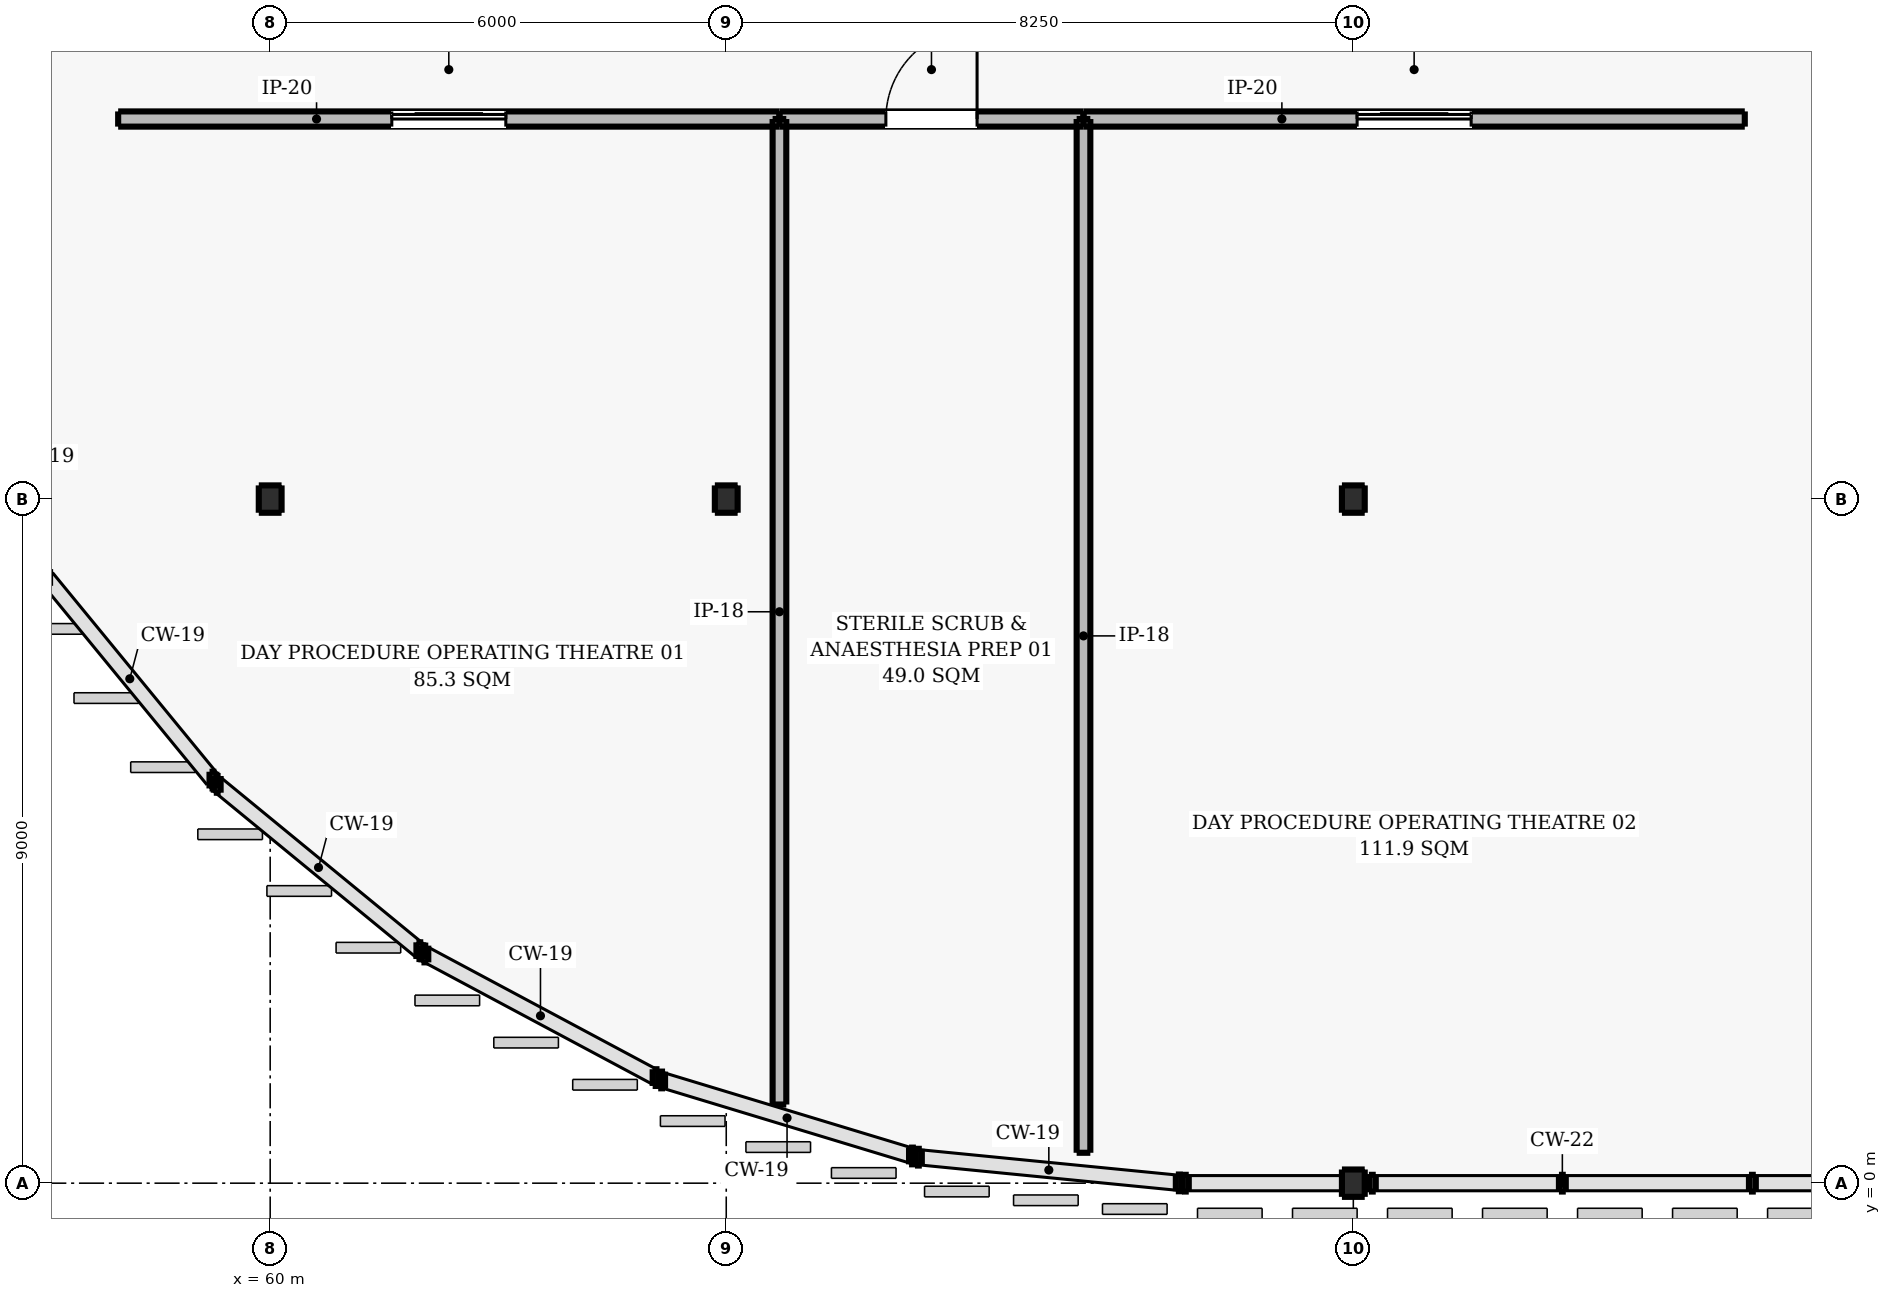
"""IFC4 building model, lengths in metres.
Left out: names, types, materials, properties, quantities, classifications, styles, units other than length and angle.
Written with IfcOpenShell. Run it as: python <this file> out.ifc"""

import sys

from ifc_helpers import new_model, si_unit, direction, frame, frame_2d, origin, origin_2d, place, context, subcontext, project, spatial, rectangle, i_section, extrude, element, fill, save


model = new_model("IFC4")
c1 = context("Model", 3, precision=1e-05, world=origin(), true_north=direction((0.0, 1.0)))
c2 = subcontext(c1, "Body", "Model", "MODEL_VIEW")
j1 = project(units=[si_unit("LENGTHUNIT", "METRE"), si_unit("PLANEANGLEUNIT", "RADIAN")], contexts=[c1])
p1 = place(None, origin())
s1 = spatial("IfcSite", under=j1, at=p1, CompositionType="ELEMENT")
p2 = place(p1, origin())
s2 = spatial("IfcBuilding", under=s1, at=p2, CompositionType="ELEMENT")
p3 = place(p2, frame((0.0, 0.0, 13.8)))
s3 = spatial("IfcBuildingStorey", under=s2, at=p3, CompositionType="ELEMENT", Elevation=13.8)
for number, where, z_axis, x_axis in (
    (1, (60.0, 9.0, 0.0), (0.0, 0.0, 1.0), (1.0, 0.0, 0.0)),
    (2, (66.0, 9.0, 0.0), (0.0, 0.0, 1.0), (1.0, 0.0, 0.0)),
    (3, (74.25, 0.0, 0.0), (0.0, 0.0, 1.0), (1.0, 0.0, 0.0)),
    (4, (74.25, 9.0, 0.0), (0.0, 0.0, 1.0), (1.0, 0.0, 0.0)),
):
    element("IfcColumn", number, at=place(p3, frame(where, z_axis=z_axis, x_axis=x_axis)), inside=s3, PredefinedType="COLUMN", context=c2, shape_type="SweptSolid", body=[
        extrude(i_section(OverallWidth=0.3, OverallDepth=0.36, WebThickness=0.012, FlangeThickness=0.022, FilletRadius=0.027, at=origin_2d()), origin(), (0.0, 0.0, 1.0), 4.2),
    ])
p4 = place(p3, frame((58.0, 14.0, 0.0), z_axis=(0.0, 0.0, 1.0), x_axis=(1.0, 0.0, 0.0)))
e5 = element("IfcWall", 5, at=p4, inside=s3, PredefinedType="PARTITIONING", context=c2, shape_type="SweptSolid", body=[
    extrude(rectangle(XDim=8.7, YDim=0.2, at=frame_2d((4.35, 0.0))), origin(), (0.0, 0.0, 1.0), 3.94),
])
p5 = place(p4, frame((3.6, 0.0, 0.0)))
e6 = element("IfcOpeningElement", 6, at=p5, cuts=e5, PredefinedType="OPENING", context=c2, shape_type="SweptSolid", body=[
    extrude(rectangle(XDim=1.5, YDim=2.25, at=frame_2d((0.75, 1.125))), frame((0.0, 0.11, 0.0), z_axis=(0.0, -1.0, 0.0), x_axis=(1.0, 0.0, 0.0)), (0.0, 0.0, 1.0), 0.22),
])
p6 = place(p3, frame((66.7, 1.035, 0.0), z_axis=(0.0, 0.0, 1.0), x_axis=(0.0, 1.0, 0.0)))
e7 = element("IfcWall", 7, at=p6, inside=s3, PredefinedType="PARTITIONING", context=c2, shape_type="SweptSolid", body=[
    extrude(rectangle(XDim=12.965, YDim=0.18, at=frame_2d((6.482, 0.0))), origin(), (0.0, 0.0, 1.0), 3.94),
])
p7 = place(p3, frame((66.7, 14.0, 0.0), z_axis=(0.0, 0.0, 1.0), x_axis=(1.0, 0.0, 0.0)))
e8 = element("IfcWall", 8, at=p7, inside=s3, PredefinedType="PARTITIONING", context=c2, shape_type="SweptSolid", body=[
    extrude(rectangle(XDim=4.0, YDim=0.2, at=frame_2d((2.0, 0.0))), origin(), (0.0, 0.0, 1.0), 3.94),
])
p8 = place(p7, frame((1.4, 0.0, 0.0)))
e9 = element("IfcOpeningElement", 9, at=p8, cuts=e8, PredefinedType="OPENING", context=c2, shape_type="SweptSolid", body=[
    extrude(rectangle(XDim=1.2, YDim=2.2, at=frame_2d((0.6, 1.1))), frame((0.0, 0.11, 0.0), z_axis=(0.0, -1.0, 0.0), x_axis=(1.0, 0.0, 0.0)), (0.0, 0.0, 1.0), 0.22),
])
p9 = place(p3, frame((70.7, 0.4, 0.0), z_axis=(0.0, 0.0, 1.0), x_axis=(0.0, 1.0, 0.0)))
e10 = element("IfcWall", 10, at=p9, inside=s3, PredefinedType="PARTITIONING", context=c2, shape_type="SweptSolid", body=[
    extrude(rectangle(XDim=13.6, YDim=0.18, at=frame_2d((6.8, 0.0))), origin(), (0.0, 0.0, 1.0), 3.94),
])
p10 = place(p3, frame((70.7, 14.0, 0.0), z_axis=(0.0, 0.0, 1.0), x_axis=(1.0, 0.0, 0.0)))
e11 = element("IfcWall", 11, at=p10, inside=s3, PredefinedType="PARTITIONING", context=c2, shape_type="SweptSolid", body=[
    extrude(rectangle(XDim=8.7, YDim=0.2, at=frame_2d((4.35, 0.0))), origin(), (0.0, 0.0, 1.0), 3.94),
])
p11 = place(p10, frame((3.6, 0.0, 0.0)))
e12 = element("IfcOpeningElement", 12, at=p11, cuts=e11, PredefinedType="OPENING", context=c2, shape_type="SweptSolid", body=[
    extrude(rectangle(XDim=1.5, YDim=2.25, at=frame_2d((0.75, 1.125))), frame((0.0, 0.11, 0.0), z_axis=(0.0, -1.0, 0.0), x_axis=(1.0, 0.0, 0.0)), (0.0, 0.0, 1.0), 0.22),
])
p12 = place(p5, origin())
e13 = element("IfcDoor", 13, at=p12, inside=s3, OperationType="SLIDING_TO_LEFT", PredefinedType="DOOR", context=c2, shape_type="SweptSolid", body=[
    extrude(rectangle(XDim=1.5, YDim=2.25, at=frame_2d((0.75, 1.125))), frame((0.0, 0.025, 0.0), z_axis=(0.0, -1.0, 0.0), x_axis=(1.0, 0.0, 0.0)), (0.0, 0.0, 1.0), 0.05),
])
fill(e6, e13)
p13 = place(p8, origin())
e14 = element("IfcDoor", 14, at=p13, inside=s3, OperationType="SINGLE_SWING_RIGHT", PredefinedType="DOOR", context=c2, shape_type="SweptSolid", body=[
    extrude(rectangle(XDim=1.2, YDim=2.2, at=frame_2d((0.6, 1.1))), frame((0.0, 0.025, 0.0), z_axis=(0.0, -1.0, 0.0), x_axis=(1.0, 0.0, 0.0)), (0.0, 0.0, 1.0), 0.05),
])
fill(e9, e14)
p14 = place(p11, origin())
e15 = element("IfcDoor", 15, at=p14, inside=s3, OperationType="SLIDING_TO_LEFT", PredefinedType="DOOR", context=c2, shape_type="SweptSolid", body=[
    extrude(rectangle(XDim=1.5, YDim=2.25, at=frame_2d((0.75, 1.125))), frame((0.0, 0.025, 0.0), z_axis=(0.0, -1.0, 0.0), x_axis=(1.0, 0.0, 0.0)), (0.0, 0.0, 1.0), 0.05),
])
fill(e12, e15)
save(model, sys.argv[1])
